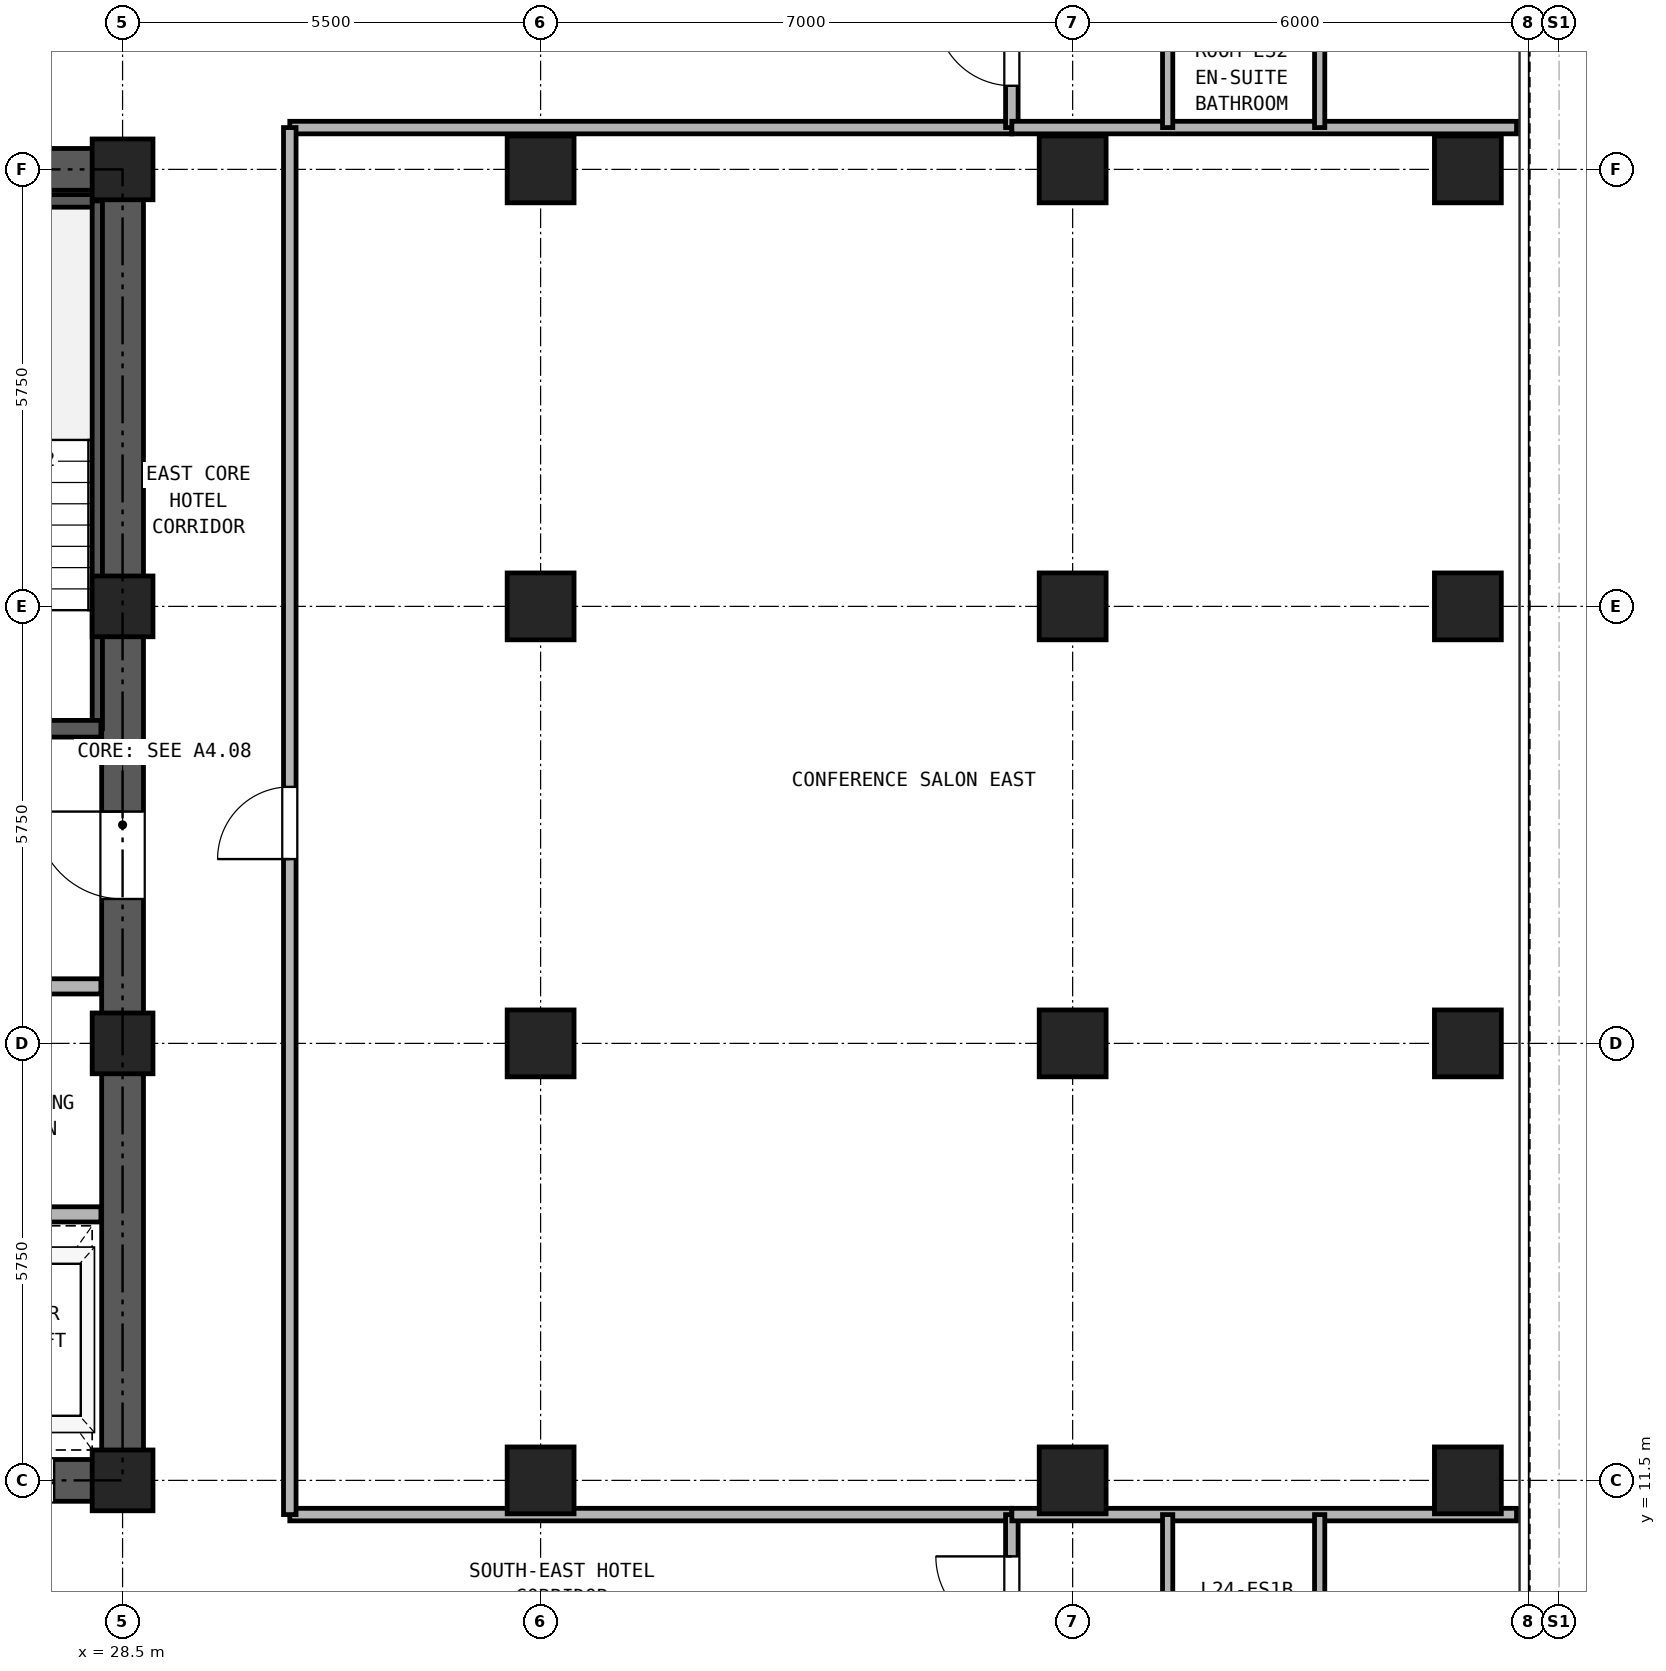
"""IFC4 building model, lengths in metres.
Left out: names, types, materials, properties, quantities, classifications, styles, units other than length and angle.
Written with IfcOpenShell. Run it as: python <this file> out.ifc"""

import sys

from ifc_helpers import new_model, si_unit, direction, frame, frame_2d, origin, origin_2d, place, context, subcontext, project, spatial, rectangle, hollow_rectangle, extrude, source, transform, mapped, element, fill, save


model = new_model("IFC4")
c1 = context("Model", 3, precision=1e-05, world=origin(), true_north=direction((0.0, 1.0)))
c2 = subcontext(c1, "Body", "Model", "MODEL_VIEW")
j1 = project(units=[si_unit("LENGTHUNIT", "METRE"), si_unit("PLANEANGLEUNIT", "RADIAN")], contexts=[c1])
p1 = place(None, origin())
s1 = spatial("IfcSite", under=j1, at=p1, CompositionType="ELEMENT")
p2 = place(p1, origin())
s2 = spatial("IfcBuilding", under=s1, at=p2, CompositionType="ELEMENT")
p3 = place(p2, frame((0.0, 0.0, 92.7)))
s3 = spatial("IfcBuildingStorey", under=s2, at=p3, CompositionType="ELEMENT", Elevation=92.7)
m1 = source(origin(), c2, "Body", "SweptSolid", [
    extrude(hollow_rectangle(XDim=0.88, YDim=0.88, WallThickness=0.05, at=origin_2d()), origin(), (0.0, 0.0, 1.0), 2.95),
])
for number, where, z_axis, x_axis in (
    (1, (46.2, 11.5, 0.0), (0.0, 0.0, 1.0), (1.0, 0.0, 0.0)),
    (2, (46.2, 17.25, 0.0), (0.0, 0.0, 1.0), (1.0, 0.0, 0.0)),
    (3, (46.2, 23.0, 0.0), (0.0, 0.0, 1.0), (1.0, 0.0, 0.0)),
    (4, (46.2, 28.75, 0.0), (0.0, 0.0, 1.0), (1.0, 0.0, 0.0)),
):
    element("IfcColumn", number, at=place(p3, frame(where, z_axis=z_axis, x_axis=x_axis)), inside=s3, PredefinedType="COLUMN", context=c2, shape_type="MappedRepresentation", body=[
        mapped(m1, transform((0.0, 0.0, 0.0), x_axis=(1.0, 0.0, 0.0), y_axis=(0.0, 1.0, 0.0), z_axis=(0.0, 0.0, 1.0), scale=1.0)),
    ])
m2 = source(origin(), c2, "Body", "SweptSolid", [
    extrude(hollow_rectangle(XDim=0.8, YDim=0.8, WallThickness=0.045, at=origin_2d()), origin(), (0.0, 0.0, 1.0), 2.95),
])
for number, where, z_axis, x_axis in (
    (5, (28.5, 11.5, 0.0), (0.0, 0.0, 1.0), (1.0, 0.0, 0.0)),
    (6, (28.5, 17.25, 0.0), (0.0, 0.0, 1.0), (1.0, 0.0, 0.0)),
    (7, (28.5, 23.0, 0.0), (0.0, 0.0, 1.0), (1.0, 0.0, 0.0)),
    (8, (28.5, 28.75, 0.0), (0.0, 0.0, 1.0), (1.0, 0.0, 0.0)),
):
    element("IfcColumn", number, at=place(p3, frame(where, z_axis=z_axis, x_axis=x_axis)), inside=s3, PredefinedType="COLUMN", context=c2, shape_type="MappedRepresentation", body=[
        mapped(m2, transform((0.0, 0.0, 0.0), x_axis=(1.0, 0.0, 0.0), y_axis=(0.0, 1.0, 0.0), z_axis=(0.0, 0.0, 1.0), scale=1.0)),
    ])
for number, where, z_axis, x_axis in (
    (9, (34.0, 11.5, 0.0), (0.0, 0.0, 1.0), (1.0, 0.0, 0.0)),
    (10, (34.0, 17.25, 0.0), (0.0, 0.0, 1.0), (1.0, 0.0, 0.0)),
    (11, (34.0, 23.0, 0.0), (0.0, 0.0, 1.0), (1.0, 0.0, 0.0)),
    (12, (34.0, 28.75, 0.0), (0.0, 0.0, 1.0), (1.0, 0.0, 0.0)),
    (13, (41.0, 11.5, 0.0), (0.0, 0.0, 1.0), (1.0, 0.0, 0.0)),
    (14, (41.0, 17.25, 0.0), (0.0, 0.0, 1.0), (1.0, 0.0, 0.0)),
    (15, (41.0, 23.0, 0.0), (0.0, 0.0, 1.0), (1.0, 0.0, 0.0)),
    (16, (41.0, 28.75, 0.0), (0.0, 0.0, 1.0), (1.0, 0.0, 0.0)),
):
    element("IfcColumn", number, at=place(p3, frame(where, z_axis=z_axis, x_axis=x_axis)), inside=s3, PredefinedType="COLUMN", context=c2, shape_type="MappedRepresentation", body=[
        mapped(m1, transform((0.0, 0.0, 0.0), x_axis=(1.0, 0.0, 0.0), y_axis=(0.0, 1.0, 0.0), z_axis=(0.0, 0.0, 1.0), scale=1.0)),
    ])
p4 = place(p3, frame((18.225, 11.5, 0.0), z_axis=(0.0, 0.0, 1.0), x_axis=(1.0, 0.0, 0.0)))
e17 = element("IfcWall", 17, at=p4, inside=s3, PredefinedType="SHEAR", context=c2, shape_type="SweptSolid", body=[
    extrude(rectangle(XDim=10.55, YDim=0.55, at=frame_2d((5.275, 0.0))), origin(), (0.0, 0.0, 1.0), 2.95),
])
p5 = place(p4, frame((5.875, 0.0, 0.0)))
e18 = element("IfcOpeningElement", 18, at=p5, cuts=e17, PredefinedType="OPENING", context=c2, shape_type="SweptSolid", body=[
    extrude(rectangle(XDim=1.1, YDim=2.25, at=frame_2d((0.55, 1.125))), frame((0.0, 0.285, 0.0), z_axis=(0.0, -1.0, 0.0), x_axis=(1.0, 0.0, 0.0)), (0.0, 0.0, 1.0), 0.57),
])
p6 = place(p4, frame((8.275, 0.0, 0.0)))
e19 = element("IfcOpeningElement", 19, at=p6, cuts=e17, PredefinedType="OPENING", context=c2, shape_type="SweptSolid", body=[
    extrude(rectangle(XDim=1.1, YDim=2.25, at=frame_2d((0.55, 1.125))), frame((0.0, 0.285, 0.0), z_axis=(0.0, -1.0, 0.0), x_axis=(1.0, 0.0, 0.0)), (0.0, 0.0, 1.0), 0.57),
])
p7 = place(p3, frame((18.225, 28.75, 0.0), z_axis=(0.0, 0.0, 1.0), x_axis=(1.0, 0.0, 0.0)))
e20 = element("IfcWall", 20, at=p7, inside=s3, PredefinedType="SHEAR", context=c2, shape_type="SweptSolid", body=[
    extrude(rectangle(XDim=10.55, YDim=0.55, at=frame_2d((5.275, 0.0))), origin(), (0.0, 0.0, 1.0), 2.95),
])
p8 = place(p7, frame((4.155, 0.0, 0.0)))
e21 = element("IfcOpeningElement", 21, at=p8, cuts=e20, PredefinedType="OPENING", context=c2, shape_type="SweptSolid", body=[
    extrude(rectangle(XDim=0.9, YDim=2.05, at=frame_2d((0.45, 1.025))), frame((0.0, 0.285, 0.0), z_axis=(0.0, -1.0, 0.0), x_axis=(1.0, 0.0, 0.0)), (0.0, 0.0, 1.0), 0.57),
])
p9 = place(p7, frame((5.695, 0.0, 0.0)))
e22 = element("IfcOpeningElement", 22, at=p9, cuts=e20, PredefinedType="OPENING", context=c2, shape_type="SweptSolid", body=[
    extrude(rectangle(XDim=0.9, YDim=2.05, at=frame_2d((0.45, 1.025))), frame((0.0, 0.285, 0.0), z_axis=(0.0, -1.0, 0.0), x_axis=(1.0, 0.0, 0.0)), (0.0, 0.0, 1.0), 0.57),
])
p10 = place(p3, frame((28.5, 11.775, 0.0), z_axis=(0.0, 0.0, 1.0), x_axis=(0.0, 1.0, 0.0)))
e23 = element("IfcWall", 23, at=p10, inside=s3, PredefinedType="SHEAR", context=c2, shape_type="SweptSolid", body=[
    extrude(rectangle(XDim=16.7, YDim=0.55, at=frame_2d((8.35, 0.0))), origin(), (0.0, 0.0, 1.0), 2.95),
])
p11 = place(p10, frame((7.375, 0.0, 0.0)))
e24 = element("IfcOpeningElement", 24, at=p11, cuts=e23, PredefinedType="OPENING", context=c2, shape_type="SweptSolid", body=[
    extrude(rectangle(XDim=1.15, YDim=2.2, at=frame_2d((0.575, 1.1))), frame((0.0, 0.285, 0.0), z_axis=(0.0, -1.0, 0.0), x_axis=(1.0, 0.0, 0.0)), (0.0, 0.0, 1.0), 0.57),
])
p12 = place(p3, frame((25.13, 28.335, 0.0), z_axis=(0.0, 0.0, 1.0), x_axis=(1.0, 0.0, 0.0)))
e25 = element("IfcWall", 25, at=p12, inside=s3, PredefinedType="PARTITIONING", context=c2, shape_type="SweptSolid", body=[
    extrude(rectangle(XDim=3.085, YDim=0.165, at=frame_2d((1.542, 0.0))), origin(), (0.0, 0.0, 1.0), 2.95),
])
p13 = place(p3, frame((28.167, 21.39, 0.0), z_axis=(0.0, 0.0, 1.0), x_axis=(0.0, 1.0, 0.0)))
e26 = element("IfcWall", 26, at=p13, inside=s3, PredefinedType="PARTITIONING", context=c2, shape_type="SweptSolid", body=[
    extrude(rectangle(XDim=6.945, YDim=0.135, at=frame_2d((3.473, 0.0))), origin(), (0.0, 0.0, 1.0), 2.95),
])
p14 = place(p3, frame((25.13, 21.39, 0.0), z_axis=(0.0, 0.0, 1.0), x_axis=(1.0, 0.0, 0.0)))
e27 = element("IfcWall", 27, at=p14, inside=s3, PredefinedType="SOLIDWALL", context=c2, shape_type="SweptSolid", body=[
    extrude(rectangle(XDim=3.085, YDim=0.22, at=frame_2d((1.542, 0.0))), origin(), (0.0, 0.0, 1.0), 2.95),
])
p15 = place(p14, frame((0.92, 0.0, 0.0)))
e28 = element("IfcOpeningElement", 28, at=p15, cuts=e27, PredefinedType="OPENING", context=c2, shape_type="SweptSolid", body=[
    extrude(rectangle(XDim=1.15, YDim=2.2, at=frame_2d((0.575, 1.1))), frame((0.0, 0.12, 0.0), z_axis=(0.0, -1.0, 0.0), x_axis=(1.0, 0.0, 0.0)), (0.0, 0.0, 1.0), 0.24),
])
p16 = place(p3, frame((18.785, 18.0, 0.0), z_axis=(0.0, 0.0, 1.0), x_axis=(1.0, 0.0, 0.0)))
e29 = element("IfcWall", 29, at=p16, inside=s3, PredefinedType="PARTITIONING", context=c2, shape_type="SweptSolid", body=[
    extrude(rectangle(XDim=9.43, YDim=0.2, at=frame_2d((4.715, 0.0))), origin(), (0.0, 0.0, 1.0), 2.95),
])
p17 = place(p16, frame((0.465, 0.0, 0.0)))
e30 = element("IfcOpeningElement", 30, at=p17, cuts=e29, PredefinedType="OPENING", context=c2, shape_type="SweptSolid", body=[
    extrude(rectangle(XDim=1.3, YDim=2.3, at=frame_2d((0.65, 1.15))), frame((0.0, 0.11, 0.0), z_axis=(0.0, -1.0, 0.0), x_axis=(1.0, 0.0, 0.0)), (0.0, 0.0, 1.0), 0.22),
])
p18 = place(p16, frame((2.565, 0.0, 0.0)))
e31 = element("IfcOpeningElement", 31, at=p18, cuts=e29, PredefinedType="OPENING", context=c2, shape_type="SweptSolid", body=[
    extrude(rectangle(XDim=1.3, YDim=2.3, at=frame_2d((0.65, 1.15))), frame((0.0, 0.11, 0.0), z_axis=(0.0, -1.0, 0.0), x_axis=(1.0, 0.0, 0.0)), (0.0, 0.0, 1.0), 0.22),
])
p19 = place(p16, frame((4.965, 0.0, 0.0)))
e32 = element("IfcOpeningElement", 32, at=p19, cuts=e29, PredefinedType="OPENING", context=c2, shape_type="SweptSolid", body=[
    extrude(rectangle(XDim=0.9, YDim=2.05, at=frame_2d((0.45, 1.025))), frame((0.0, 0.11, 0.0), z_axis=(0.0, -1.0, 0.0), x_axis=(1.0, 0.0, 0.0)), (0.0, 0.0, 1.0), 0.22),
])
p20 = place(p16, frame((7.665, 0.0, 0.0)))
e33 = element("IfcOpeningElement", 33, at=p20, cuts=e29, PredefinedType="OPENING", context=c2, shape_type="SweptSolid", body=[
    extrude(rectangle(XDim=0.9, YDim=2.05, at=frame_2d((0.45, 1.025))), frame((0.0, 0.11, 0.0), z_axis=(0.0, -1.0, 0.0), x_axis=(1.0, 0.0, 0.0)), (0.0, 0.0, 1.0), 0.22),
])
p21 = place(p3, frame((18.785, 15.0, 0.0), z_axis=(0.0, 0.0, 1.0), x_axis=(1.0, 0.0, 0.0)))
e34 = element("IfcWall", 34, at=p21, inside=s3, PredefinedType="PARTITIONING", context=c2, shape_type="SweptSolid", body=[
    extrude(rectangle(XDim=9.43, YDim=0.2, at=frame_2d((4.715, 0.0))), origin(), (0.0, 0.0, 1.0), 2.95),
])
for number, where, z_axis, x_axis in (
    (35, (30.7, 11.05, 0.0), (0.0, 0.0, 1.0), (1.0, 0.0, 0.0)),
    (36, (30.7, 29.3, 0.0), (0.0, 0.0, 1.0), (1.0, 0.0, 0.0)),
):
    element("IfcWall", number, at=place(p3, frame(where, z_axis=z_axis, x_axis=x_axis)), inside=s3, PredefinedType="PARTITIONING", context=c2, shape_type="SweptSolid", body=[
        extrude(rectangle(XDim=9.5, YDim=0.165, at=frame_2d((4.75, 0.0))), origin(), (0.0, 0.0, 1.0), 2.95),
    ])
p22 = place(p3, frame((30.7, 11.05, 0.0), z_axis=(0.0, 0.0, 1.0), x_axis=(0.0, 1.0, 0.0)))
e37 = element("IfcWall", 37, at=p22, inside=s3, PredefinedType="PARTITIONING", context=c2, shape_type="SweptSolid", body=[
    extrude(rectangle(XDim=18.25, YDim=0.165, at=frame_2d((9.125, 0.0))), origin(), (0.0, 0.0, 1.0), 2.95),
])
p23 = place(p22, frame((8.625, 0.0, 0.0)))
e38 = element("IfcOpeningElement", 38, at=p23, cuts=e37, PredefinedType="OPENING", context=c2, shape_type="SweptSolid", body=[
    extrude(rectangle(XDim=0.95, YDim=2.15, at=frame_2d((0.475, 1.075))), frame((0.0, 0.093, 0.0), z_axis=(0.0, -1.0, 0.0), x_axis=(1.0, 0.0, 0.0)), (0.0, 0.0, 1.0), 0.185),
])
p24 = place(p3, frame((40.2, 0.16, 0.0), z_axis=(0.0, 0.0, 1.0), x_axis=(0.0, 1.0, 0.0)))
e39 = element("IfcWall", 39, at=p24, inside=s3, PredefinedType="PARTITIONING", context=c2, shape_type="SweptSolid", body=[
    extrude(rectangle(XDim=10.89, YDim=0.165, at=frame_2d((5.445, 0.0))), origin(), (0.0, 0.0, 1.0), 2.95),
])
p25 = place(p24, frame((9.34, 0.0, 0.0)))
e40 = element("IfcOpeningElement", 40, at=p25, cuts=e39, PredefinedType="OPENING", context=c2, shape_type="SweptSolid", body=[
    extrude(rectangle(XDim=1.0, YDim=2.15, at=frame_2d((0.5, 1.075))), frame((0.0, 0.093, 0.0), z_axis=(0.0, -1.0, 0.0), x_axis=(1.0, 0.0, 0.0)), (0.0, 0.0, 1.0), 0.185),
])
p26 = place(p3, frame((40.2, 29.3, 0.0), z_axis=(0.0, 0.0, 1.0), x_axis=(0.0, 1.0, 0.0)))
e41 = element("IfcWall", 41, at=p26, inside=s3, PredefinedType="PARTITIONING", context=c2, shape_type="SweptSolid", body=[
    extrude(rectangle(XDim=5.84, YDim=0.165, at=frame_2d((2.92, 0.0))), origin(), (0.0, 0.0, 1.0), 2.95),
])
p27 = place(p26, frame((0.55, 0.0, 0.0)))
e42 = element("IfcOpeningElement", 42, at=p27, cuts=e41, PredefinedType="OPENING", context=c2, shape_type="SweptSolid", body=[
    extrude(rectangle(XDim=1.0, YDim=2.15, at=frame_2d((0.5, 1.075))), frame((0.0, 0.093, 0.0), z_axis=(0.0, -1.0, 0.0), x_axis=(1.0, 0.0, 0.0)), (0.0, 0.0, 1.0), 0.185),
])
for number, where, z_axis, x_axis in (
    (43, (40.2, 11.05, 0.0), (0.0, 0.0, 1.0), (1.0, 0.0, 0.0)),
    (44, (40.2, 29.3, 0.0), (0.0, 0.0, 1.0), (1.0, 0.0, 0.0)),
):
    element("IfcWall", number, at=place(p3, frame(where, z_axis=z_axis, x_axis=x_axis)), inside=s3, PredefinedType="PARTITIONING", context=c2, shape_type="SweptSolid", body=[
        extrude(rectangle(XDim=6.64, YDim=0.165, at=frame_2d((3.32, 0.0))), origin(), (0.0, 0.0, 1.0), 2.95),
    ])
for number, where, z_axis, x_axis in (
    (45, (42.25, 8.95, 0.0), (0.0, 0.0, 1.0), (0.0, 1.0, 0.0)),
    (46, (44.25, 8.95, 0.0), (0.0, 0.0, 1.0), (0.0, 1.0, 0.0)),
):
    element("IfcWall", number, at=place(p3, frame(where, z_axis=z_axis, x_axis=x_axis)), inside=s3, PredefinedType="PARTITIONING", context=c2, shape_type="SweptSolid", body=[
        extrude(rectangle(XDim=2.1, YDim=0.135, at=frame_2d((1.05, 0.0))), origin(), (0.0, 0.0, 1.0), 2.95),
    ])
for number, where, z_axis, x_axis in (
    (47, (42.25, 29.3, 0.0), (0.0, 0.0, 1.0), (0.0, 1.0, 0.0)),
    (48, (44.25, 29.3, 0.0), (0.0, 0.0, 1.0), (0.0, 1.0, 0.0)),
):
    element("IfcWall", number, at=place(p3, frame(where, z_axis=z_axis, x_axis=x_axis)), inside=s3, PredefinedType="PARTITIONING", context=c2, shape_type="SweptSolid", body=[
        extrude(rectangle(XDim=2.1, YDim=0.135, at=frame_2d((1.05, 0.0))), origin(), (0.0, 0.0, 1.0), 2.95),
    ])
p28 = place(p11, origin())
e49 = element("IfcDoor", 49, at=p28, inside=s3, OperationType="SINGLE_SWING_RIGHT", PredefinedType="DOOR", context=c2, shape_type="SweptSolid", body=[
    extrude(rectangle(XDim=1.15, YDim=2.2, at=frame_2d((0.575, 1.1))), frame((0.0, 0.025, 0.0), z_axis=(0.0, -1.0, 0.0), x_axis=(1.0, 0.0, 0.0)), (0.0, 0.0, 1.0), 0.05),
])
fill(e24, e49)
p29 = place(p6, frame((1.1, 0.0, 0.0), z_axis=(0.0, 0.0, 1.0), x_axis=(-1.0, 0.0, 0.0)))
e50 = element("IfcDoor", 50, at=p29, inside=s3, OperationType="DOUBLE_DOOR_SLIDING", PredefinedType="DOOR", context=c2, shape_type="SweptSolid", body=[
    extrude(rectangle(XDim=1.1, YDim=2.25, at=frame_2d((0.55, 1.125))), frame((0.0, 0.025, 0.0), z_axis=(0.0, -1.0, 0.0), x_axis=(1.0, 0.0, 0.0)), (0.0, 0.0, 1.0), 0.05),
])
fill(e19, e50)
p30 = place(p25, frame((1.0, 0.0, 0.0), z_axis=(0.0, 0.0, 1.0), x_axis=(-1.0, 0.0, 0.0)))
e51 = element("IfcDoor", 51, at=p30, inside=s3, OperationType="SINGLE_SWING_RIGHT", PredefinedType="DOOR", context=c2, shape_type="SweptSolid", body=[
    extrude(rectangle(XDim=1.0, YDim=2.15, at=frame_2d((0.5, 1.075))), frame((0.0, 0.025, 0.0), z_axis=(0.0, -1.0, 0.0), x_axis=(1.0, 0.0, 0.0)), (0.0, 0.0, 1.0), 0.05),
])
fill(e40, e51)
p31 = place(p27, frame((1.0, 0.0, 0.0), z_axis=(0.0, 0.0, 1.0), x_axis=(-1.0, 0.0, 0.0)))
e52 = element("IfcDoor", 52, at=p31, inside=s3, OperationType="SINGLE_SWING_RIGHT", PredefinedType="DOOR", context=c2, shape_type="SweptSolid", body=[
    extrude(rectangle(XDim=1.0, YDim=2.15, at=frame_2d((0.5, 1.075))), frame((0.0, 0.025, 0.0), z_axis=(0.0, -1.0, 0.0), x_axis=(1.0, 0.0, 0.0)), (0.0, 0.0, 1.0), 0.05),
])
fill(e42, e52)
p32 = place(p23, origin())
e53 = element("IfcDoor", 53, at=p32, inside=s3, OperationType="SINGLE_SWING_LEFT", PredefinedType="DOOR", context=c2, shape_type="SweptSolid", body=[
    extrude(rectangle(XDim=0.95, YDim=2.15, at=frame_2d((0.475, 1.075))), frame((0.0, 0.025, 0.0), z_axis=(0.0, -1.0, 0.0), x_axis=(1.0, 0.0, 0.0)), (0.0, 0.0, 1.0), 0.05),
])
fill(e38, e53)
save(model, sys.argv[1])
